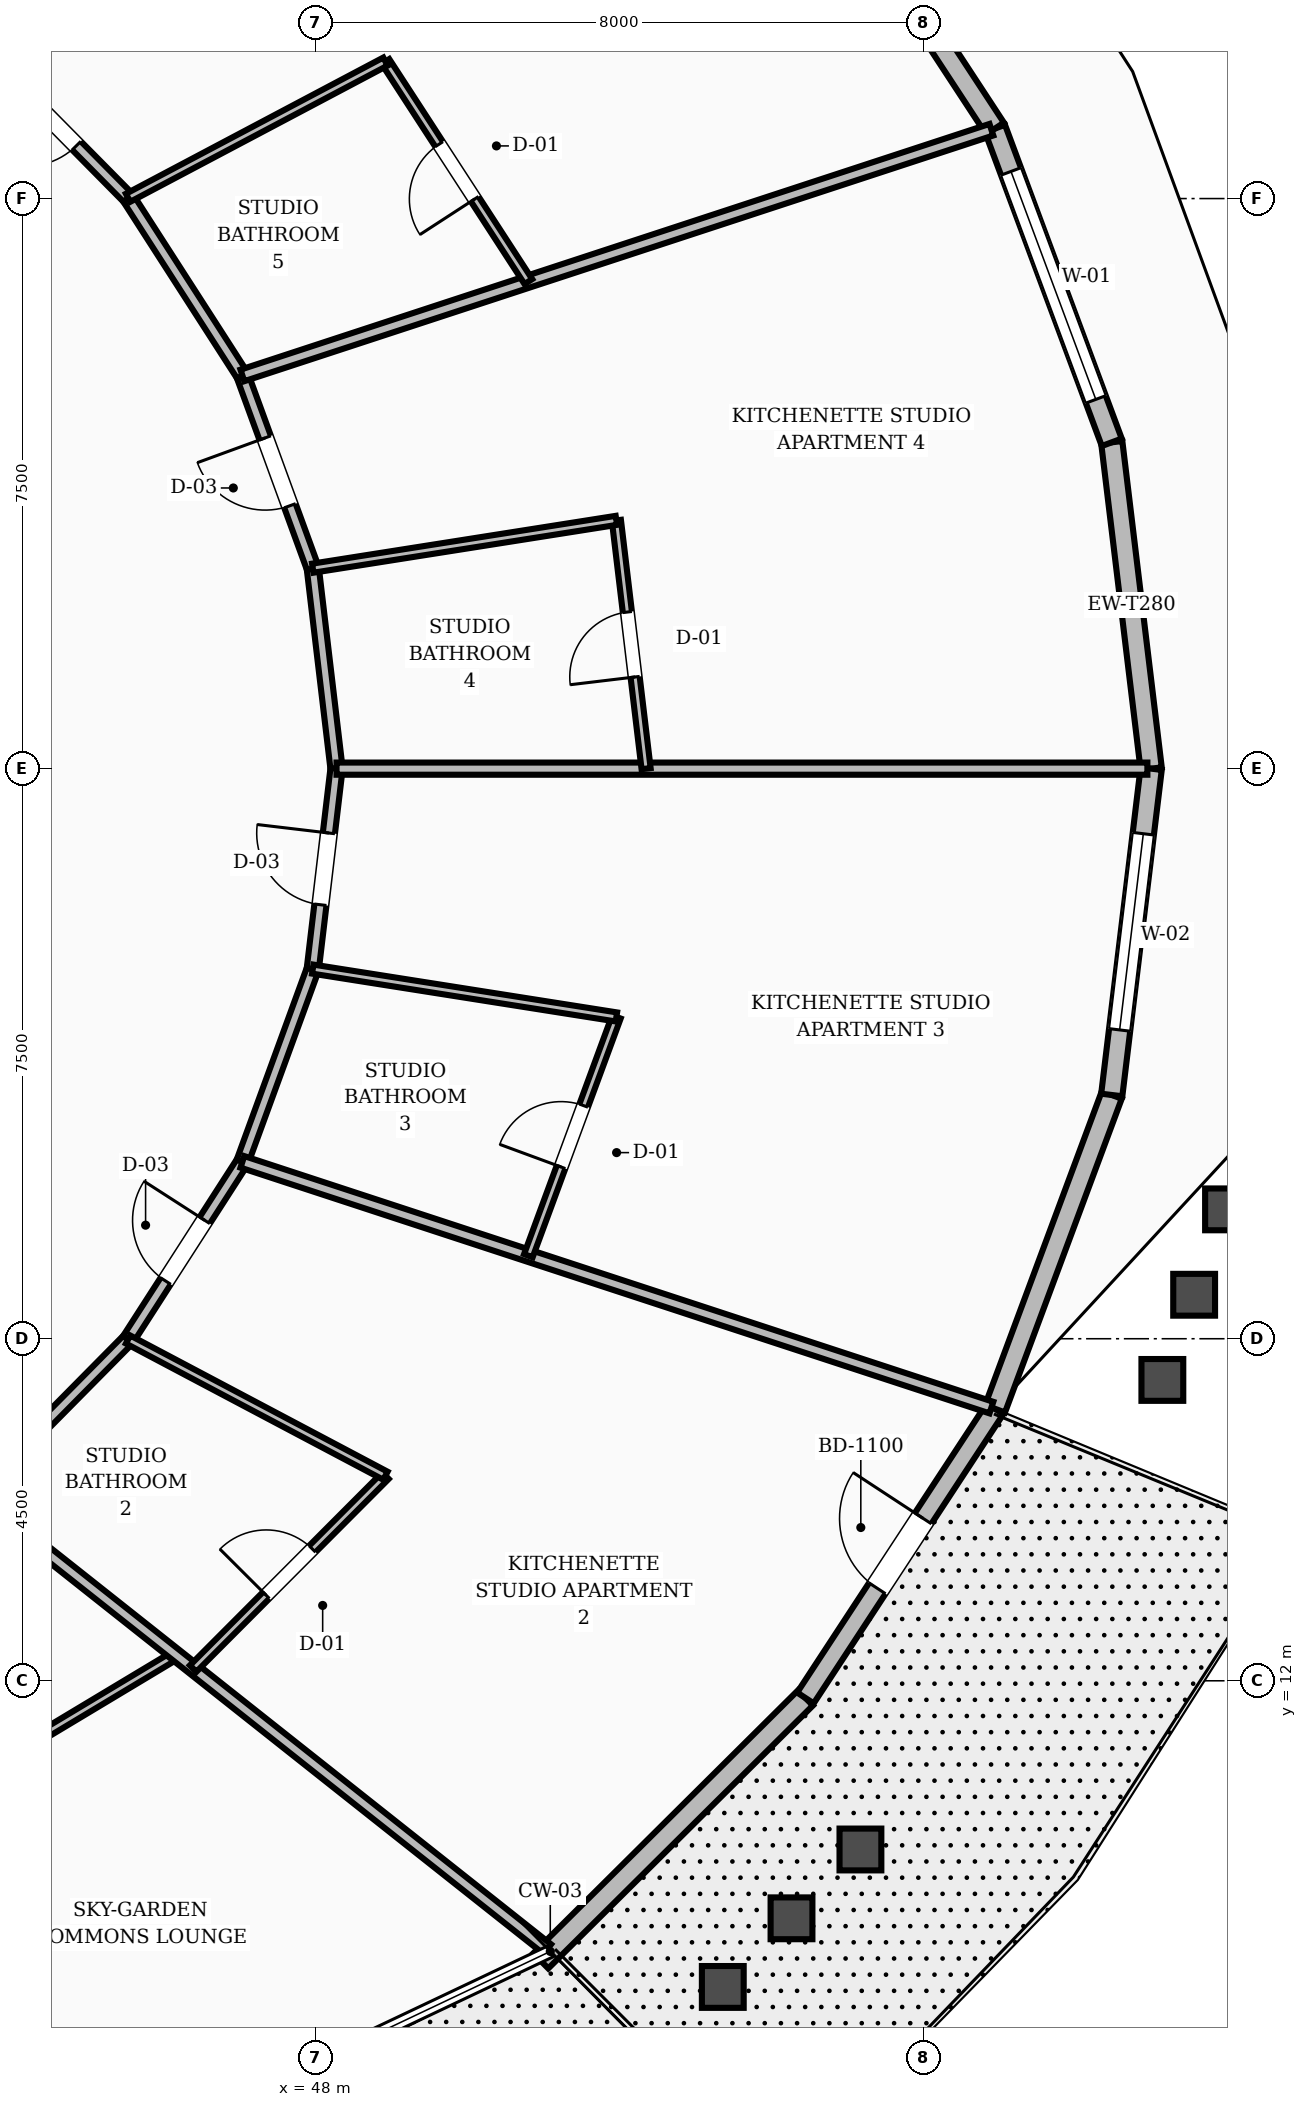
"""IFC4 building model, lengths in metres.
Left out: names, types, materials, properties, quantities, classifications, styles, units other than length and angle.
Written with IfcOpenShell. Run it as: python <this file> out.ifc"""

import sys

from ifc_helpers import new_model, si_unit, direction, frame, frame_2d, origin, place, context, subcontext, project, spatial, rectangle, extrude, element, fill, save


model = new_model("IFC4")
c1 = context("Model", 3, precision=1e-05, world=origin(), true_north=direction((0.0, 1.0)))
c2 = subcontext(c1, "Body", "Model", "MODEL_VIEW")
j1 = project(units=[si_unit("LENGTHUNIT", "METRE"), si_unit("PLANEANGLEUNIT", "RADIAN")], contexts=[c1])
p1 = place(None, origin())
s1 = spatial("IfcSite", under=j1, at=p1, CompositionType="ELEMENT")
p2 = place(p1, origin())
s2 = spatial("IfcBuilding", under=s1, at=p2, CompositionType="ELEMENT")
p3 = place(p2, frame((0.0, 0.0, 88.0)))
s3 = spatial("IfcBuildingStorey", under=s2, at=p3, CompositionType="ELEMENT", Elevation=88.0)
p4 = place(p3, frame((58.992, 24.0, 0.0), z_axis=(0.0, 0.0, 1.0), x_axis=(-0.11991322244, 0.992784376934, 0.0)))
e1 = element("IfcWall", 1, at=p4, inside=s3, PredefinedType="STANDARD", context=c2, shape_type="SweptSolid", body=[
    extrude(rectangle(XDim=4.324, YDim=0.28, at=frame_2d((2.162, 0.0))), origin(), (0.0, 0.0, 1.0), 2.71),
])
p5 = place(p3, frame((58.473, 28.293, 0.0), z_axis=(0.0, 0.0, 1.0), x_axis=(-0.348747298865, 0.937216795376, 0.0)))
e2 = element("IfcWall", 2, at=p5, inside=s3, PredefinedType="STANDARD", context=c2, shape_type="SweptSolid", body=[
    extrude(rectangle(XDim=4.405, YDim=0.28, at=frame_2d((2.202, 0.0))), origin(), (0.0, 0.0, 1.0), 2.71),
])
p6 = place(p5, frame((0.602, 0.0, 0.8)))
e3 = element("IfcOpeningElement", 3, at=p6, cuts=e2, PredefinedType="OPENING", context=c2, shape_type="SweptSolid", body=[
    extrude(rectangle(XDim=3.2, YDim=1.65, at=frame_2d((1.6, 0.825))), frame((0.0, 0.15, 0.0), z_axis=(0.0, -1.0, 0.0), x_axis=(1.0, 0.0, 0.0)), (0.0, 0.0, 1.0), 0.3),
])
p7 = place(p3, frame((56.937, 32.421, 0.0), z_axis=(0.0, 0.0, 1.0), x_axis=(-0.548243756992, 0.836318589366, 0.0)))
e4 = element("IfcWall", 4, at=p7, inside=s3, PredefinedType="STANDARD", context=c2, shape_type="SweptSolid", body=[
    extrude(rectangle(XDim=4.549, YDim=0.28, at=frame_2d((2.275, 0.0))), origin(), (0.0, 0.0, 1.0), 2.71),
])
p8 = place(p3, frame((50.961, 8.315, 0.0), z_axis=(0.0, 0.0, 1.0), x_axis=(0.709441021492, 0.704764809724, 0.0)))
e5 = element("IfcWall", 5, at=p8, inside=s3, PredefinedType="STANDARD", context=c2, shape_type="SweptSolid", body=[
    extrude(rectangle(XDim=4.908, YDim=0.28, at=frame_2d((2.454, 0.0))), origin(), (0.0, 0.0, 1.0), 2.71),
])
p9 = place(p3, frame((54.443, 11.774, 0.0), z_axis=(0.0, 0.0, 1.0), x_axis=(0.548243756992, 0.836318589366, 0.0)))
e6 = element("IfcWall", 6, at=p9, inside=s3, PredefinedType="STANDARD", context=c2, shape_type="SweptSolid", body=[
    extrude(rectangle(XDim=4.549, YDim=0.26, at=frame_2d((2.275, 0.0))), origin(), (0.0, 0.0, 1.0), 2.71),
])
p10 = place(p9, frame((1.725, 0.0, 0.0)))
e7 = element("IfcOpeningElement", 7, at=p10, cuts=e6, PredefinedType="OPENING", context=c2, shape_type="SweptSolid", body=[
    extrude(rectangle(XDim=1.1, YDim=2.15, at=frame_2d((0.55, 1.075))), frame((0.0, 0.14, 0.0), z_axis=(0.0, -1.0, 0.0), x_axis=(1.0, 0.0, 0.0)), (0.0, 0.0, 1.0), 0.28),
])
p11 = place(p3, frame((56.937, 15.579, 0.0), z_axis=(0.0, 0.0, 1.0), x_axis=(0.348747298865, 0.937216795376, 0.0)))
e8 = element("IfcWall", 8, at=p11, inside=s3, PredefinedType="STANDARD", context=c2, shape_type="SweptSolid", body=[
    extrude(rectangle(XDim=4.405, YDim=0.28, at=frame_2d((2.202, 0.0))), origin(), (0.0, 0.0, 1.0), 2.71),
])
p12 = place(p3, frame((58.473, 19.707, 0.0), z_axis=(0.0, 0.0, 1.0), x_axis=(0.11991322244, 0.992784376934, 0.0)))
e9 = element("IfcWall", 9, at=p12, inside=s3, PredefinedType="STANDARD", context=c2, shape_type="SweptSolid", body=[
    extrude(rectangle(XDim=4.324, YDim=0.28, at=frame_2d((2.162, 0.0))), origin(), (0.0, 0.0, 1.0), 2.71),
])
p13 = place(p12, frame((0.862, 0.0, 0.8)))
e10 = element("IfcOpeningElement", 10, at=p13, cuts=e9, PredefinedType="OPENING", context=c2, shape_type="SweptSolid", body=[
    extrude(rectangle(XDim=2.6, YDim=1.65, at=frame_2d((1.3, 0.825))), frame((0.0, 0.15, 0.0), z_axis=(0.0, -1.0, 0.0), x_axis=(1.0, 0.0, 0.0)), (0.0, 0.0, 1.0), 0.3),
])
p14 = place(p3, frame((48.274, 24.0, 0.0), z_axis=(0.0, 0.0, 1.0), x_axis=(-0.117763961213, 0.99304161516, 0.0)))
e11 = element("IfcWall", 11, at=p14, inside=s3, PredefinedType="SOLIDWALL", context=c2, shape_type="SweptSolid", body=[
    extrude(rectangle(XDim=2.656, YDim=0.16, at=frame_2d((1.328, 0.0))), origin(), (0.0, 0.0, 1.0), 2.71),
])
p15 = place(p3, frame((47.961, 26.637, 0.0), z_axis=(0.0, 0.0, 1.0), x_axis=(-0.343013437329, 0.939330496583, 0.0)))
e12 = element("IfcWall", 12, at=p15, inside=s3, PredefinedType="SOLIDWALL", context=c2, shape_type="SweptSolid", body=[
    extrude(rectangle(XDim=2.7, YDim=0.16, at=frame_2d((1.35, 0.0))), origin(), (0.0, 0.0, 1.0), 2.71),
])
p16 = place(p15, frame((0.875, 0.0, 0.0)))
e13 = element("IfcOpeningElement", 13, at=p16, cuts=e12, PredefinedType="OPENING", context=c2, shape_type="SweptSolid", body=[
    extrude(rectangle(XDim=0.95, YDim=2.1, at=frame_2d((0.475, 1.05))), frame((0.0, 0.09, 0.0), z_axis=(0.0, -1.0, 0.0), x_axis=(1.0, 0.0, 0.0)), (0.0, 0.0, 1.0), 0.18),
])
p17 = place(p3, frame((47.035, 29.173, 0.0), z_axis=(0.0, 0.0, 1.0), x_axis=(-0.541126045017, 0.840941498206, 0.0)))
e14 = element("IfcWall", 14, at=p17, inside=s3, PredefinedType="SOLIDWALL", context=c2, shape_type="SweptSolid", body=[
    extrude(rectangle(XDim=2.779, YDim=0.16, at=frame_2d((1.39, 0.0))), origin(), (0.0, 0.0, 1.0), 2.71),
])
p18 = place(p3, frame((45.531, 31.51, 0.0), z_axis=(0.0, 0.0, 1.0), x_axis=(-0.702811997, 0.711375636969, 0.0)))
e15 = element("IfcWall", 15, at=p18, inside=s3, PredefinedType="SOLIDWALL", context=c2, shape_type="SweptSolid", body=[
    extrude(rectangle(XDim=2.879, YDim=0.16, at=frame_2d((1.44, 0.0))), origin(), (0.0, 0.0, 1.0), 2.71),
])
p19 = place(p18, frame((0.965, 0.0, 0.0)))
e16 = element("IfcOpeningElement", 16, at=p19, cuts=e15, PredefinedType="OPENING", context=c2, shape_type="SweptSolid", body=[
    extrude(rectangle(XDim=0.95, YDim=2.1, at=frame_2d((0.475, 1.05))), frame((0.0, 0.09, 0.0), z_axis=(0.0, -1.0, 0.0), x_axis=(1.0, 0.0, 0.0)), (0.0, 0.0, 1.0), 0.18),
])
p20 = place(p3, frame((43.508, 14.441, 0.0), z_axis=(0.0, 0.0, 1.0), x_axis=(0.702811997, 0.711375636969, 0.0)))
e17 = element("IfcWall", 17, at=p20, inside=s3, PredefinedType="SOLIDWALL", context=c2, shape_type="SweptSolid", body=[
    extrude(rectangle(XDim=2.879, YDim=0.16, at=frame_2d((1.44, 0.0))), origin(), (0.0, 0.0, 1.0), 2.71),
])
p21 = place(p3, frame((45.531, 16.49, 0.0), z_axis=(0.0, 0.0, 1.0), x_axis=(0.541126045017, 0.840941498206, 0.0)))
e18 = element("IfcWall", 18, at=p21, inside=s3, PredefinedType="SOLIDWALL", context=c2, shape_type="SweptSolid", body=[
    extrude(rectangle(XDim=2.779, YDim=0.16, at=frame_2d((1.39, 0.0))), origin(), (0.0, 0.0, 1.0), 2.71),
])
p22 = place(p21, frame((0.915, 0.0, 0.0)))
e19 = element("IfcOpeningElement", 19, at=p22, cuts=e18, PredefinedType="OPENING", context=c2, shape_type="SweptSolid", body=[
    extrude(rectangle(XDim=0.95, YDim=2.1, at=frame_2d((0.475, 1.05))), frame((0.0, 0.09, 0.0), z_axis=(0.0, -1.0, 0.0), x_axis=(1.0, 0.0, 0.0)), (0.0, 0.0, 1.0), 0.18),
])
p23 = place(p3, frame((47.035, 18.827, 0.0), z_axis=(0.0, 0.0, 1.0), x_axis=(0.343013437329, 0.939330496583, 0.0)))
e20 = element("IfcWall", 20, at=p23, inside=s3, PredefinedType="SOLIDWALL", context=c2, shape_type="SweptSolid", body=[
    extrude(rectangle(XDim=2.7, YDim=0.16, at=frame_2d((1.35, 0.0))), origin(), (0.0, 0.0, 1.0), 2.71),
])
p24 = place(p3, frame((47.961, 21.363, 0.0), z_axis=(0.0, 0.0, 1.0), x_axis=(0.117763961213, 0.99304161516, 0.0)))
e21 = element("IfcWall", 21, at=p24, inside=s3, PredefinedType="SOLIDWALL", context=c2, shape_type="SweptSolid", body=[
    extrude(rectangle(XDim=2.656, YDim=0.16, at=frame_2d((1.328, 0.0))), origin(), (0.0, 0.0, 1.0), 2.71),
])
p25 = place(p24, frame((0.853, 0.0, 0.0)))
e22 = element("IfcOpeningElement", 22, at=p25, cuts=e21, PredefinedType="OPENING", context=c2, shape_type="SweptSolid", body=[
    extrude(rectangle(XDim=0.95, YDim=2.1, at=frame_2d((0.475, 1.05))), frame((0.0, 0.09, 0.0), z_axis=(0.0, -1.0, 0.0), x_axis=(1.0, 0.0, 0.0)), (0.0, 0.0, 1.0), 0.18),
])
p26 = place(p3, frame((43.017, 10.453, 0.0), z_axis=(0.0, 0.0, 1.0), x_axis=(0.857287225794, 0.514838433385, 0.0)))
e23 = element("IfcWall", 23, at=p26, inside=s3, PredefinedType="PARTITIONING", context=c2, shape_type="SweptSolid", body=[
    extrude(rectangle(XDim=3.667, YDim=0.12, at=frame_2d((1.833, 0.0))), origin(), (0.0, 0.0, 1.0), 2.71),
])
p27 = place(p3, frame((43.508, 14.441, 0.0), z_axis=(0.0, 0.0, 1.0), x_axis=(0.783915576776, -0.620867432298, 0.0)))
e24 = element("IfcWall", 24, at=p27, inside=s3, PredefinedType="SOLIDWALL", context=c2, shape_type="SweptSolid", body=[
    extrude(rectangle(XDim=9.617, YDim=0.16, at=frame_2d((4.809, 0.0))), origin(), (0.0, 0.0, 1.0), 2.71),
])
p28 = place(p3, frame((46.387, 12.16, 0.0), z_axis=(0.0, 0.0, 1.0), x_axis=(0.706152338319, 0.708059937496, 0.0)))
e25 = element("IfcWall", 25, at=p28, inside=s3, PredefinedType="PARTITIONING", context=c2, shape_type="SweptSolid", body=[
    extrude(rectangle(XDim=3.583, YDim=0.12, at=frame_2d((1.792, 0.0))), origin(), (0.0, 0.0, 1.0), 2.71),
])
p29 = place(p28, frame((1.362, 0.0, 0.0)))
e26 = element("IfcOpeningElement", 26, at=p29, cuts=e25, PredefinedType="OPENING", context=c2, shape_type="SweptSolid", body=[
    extrude(rectangle(XDim=0.86, YDim=2.1, at=frame_2d((0.43, 1.05))), frame((0.0, 0.07, 0.0), z_axis=(0.0, -1.0, 0.0), x_axis=(1.0, 0.0, 0.0)), (0.0, 0.0, 1.0), 0.14),
])
p30 = place(p3, frame((45.531, 16.49, 0.0), z_axis=(0.0, 0.0, 1.0), x_axis=(0.883879348267, -0.46771497486, 0.0)))
e27 = element("IfcWall", 27, at=p30, inside=s3, PredefinedType="PARTITIONING", context=c2, shape_type="SweptSolid", body=[
    extrude(rectangle(XDim=3.831, YDim=0.12, at=frame_2d((1.916, 0.0))), origin(), (0.0, 0.0, 1.0), 2.71),
])
p31 = place(p3, frame((47.035, 18.827, 0.0), z_axis=(0.0, 0.0, 1.0), x_axis=(0.950181432226, -0.311697362603, 0.0)))
e28 = element("IfcWall", 28, at=p31, inside=s3, PredefinedType="SOLIDWALL", context=c2, shape_type="SweptSolid", body=[
    extrude(rectangle(XDim=10.371, YDim=0.16, at=frame_2d((5.186, 0.0))), origin(), (0.0, 0.0, 1.0), 2.71),
])
p32 = place(p3, frame((50.798, 17.593, 0.0), z_axis=(0.0, 0.0, 1.0), x_axis=(0.345914895338, 0.938265892582, 0.0)))
e29 = element("IfcWall", 29, at=p32, inside=s3, PredefinedType="PARTITIONING", context=c2, shape_type="SweptSolid", body=[
    extrude(rectangle(XDim=3.347, YDim=0.12, at=frame_2d((1.674, 0.0))), origin(), (0.0, 0.0, 1.0), 2.71),
])
p33 = place(p32, frame((1.244, 0.0, 0.0)))
e30 = element("IfcOpeningElement", 30, at=p33, cuts=e29, PredefinedType="OPENING", context=c2, shape_type="SweptSolid", body=[
    extrude(rectangle(XDim=0.86, YDim=2.1, at=frame_2d((0.43, 1.05))), frame((0.0, 0.07, 0.0), z_axis=(0.0, -1.0, 0.0), x_axis=(1.0, 0.0, 0.0)), (0.0, 0.0, 1.0), 0.14),
])
p34 = place(p3, frame((47.961, 21.363, 0.0), z_axis=(0.0, 0.0, 1.0), x_axis=(0.987813821357, -0.155640143715, 0.0)))
e31 = element("IfcWall", 31, at=p34, inside=s3, PredefinedType="PARTITIONING", context=c2, shape_type="SweptSolid", body=[
    extrude(rectangle(XDim=4.044, YDim=0.12, at=frame_2d((2.022, 0.0))), origin(), (0.0, 0.0, 1.0), 2.71),
])
p35 = place(p3, frame((48.274, 24.0, 0.0), z_axis=(0.0, 0.0, 1.0), x_axis=(1.0, 0.0, 0.0)))
e32 = element("IfcWall", 32, at=p35, inside=s3, PredefinedType="SOLIDWALL", context=c2, shape_type="SweptSolid", body=[
    extrude(rectangle(XDim=10.668, YDim=0.16, at=frame_2d((5.334, 0.0))), origin(), (0.0, 0.0, 1.0), 2.71),
])
p36 = place(p3, frame((52.347, 24.0, 0.0), z_axis=(0.0, 0.0, 1.0), x_axis=(-0.118808697947, 0.992917163359, 0.0)))
e33 = element("IfcWall", 33, at=p36, inside=s3, PredefinedType="PARTITIONING", context=c2, shape_type="SweptSolid", body=[
    extrude(rectangle(XDim=3.29, YDim=0.12, at=frame_2d((1.645, 0.0))), origin(), (0.0, 0.0, 1.0), 2.71),
])
p37 = place(p36, frame((1.215, 0.0, 0.0)))
e34 = element("IfcOpeningElement", 34, at=p37, cuts=e33, PredefinedType="OPENING", context=c2, shape_type="SweptSolid", body=[
    extrude(rectangle(XDim=0.86, YDim=2.1, at=frame_2d((0.43, 1.05))), frame((0.0, 0.07, 0.0), z_axis=(0.0, -1.0, 0.0), x_axis=(1.0, 0.0, 0.0)), (0.0, 0.0, 1.0), 0.14),
])
p38 = place(p3, frame((47.961, 26.637, 0.0), z_axis=(0.0, 0.0, 1.0), x_axis=(0.987813821357, 0.155640143715, 0.0)))
e35 = element("IfcWall", 35, at=p38, inside=s3, PredefinedType="PARTITIONING", context=c2, shape_type="SweptSolid", body=[
    extrude(rectangle(XDim=4.044, YDim=0.12, at=frame_2d((2.022, 0.0))), origin(), (0.0, 0.0, 1.0), 2.71),
])
p39 = place(p3, frame((47.035, 29.173, 0.0), z_axis=(0.0, 0.0, 1.0), x_axis=(0.950181432226, 0.311697362603, 0.0)))
e36 = element("IfcWall", 36, at=p39, inside=s3, PredefinedType="SOLIDWALL", context=c2, shape_type="SweptSolid", body=[
    extrude(rectangle(XDim=10.371, YDim=0.16, at=frame_2d((5.186, 0.0))), origin(), (0.0, 0.0, 1.0), 2.71),
])
p40 = place(p3, frame((50.798, 30.407, 0.0), z_axis=(0.0, 0.0, 1.0), x_axis=(-0.544687497821, 0.83863909384, 0.0)))
e37 = element("IfcWall", 37, at=p40, inside=s3, PredefinedType="PARTITIONING", context=c2, shape_type="SweptSolid", body=[
    extrude(rectangle(XDim=3.452, YDim=0.12, at=frame_2d((1.726, 0.0))), origin(), (0.0, 0.0, 1.0), 2.71),
])
p41 = place(p40, frame((1.296, 0.0, 0.0)))
e38 = element("IfcOpeningElement", 38, at=p41, cuts=e37, PredefinedType="OPENING", context=c2, shape_type="SweptSolid", body=[
    extrude(rectangle(XDim=0.86, YDim=2.1, at=frame_2d((0.43, 1.05))), frame((0.0, 0.07, 0.0), z_axis=(0.0, -1.0, 0.0), x_axis=(1.0, 0.0, 0.0)), (0.0, 0.0, 1.0), 0.14),
])
p42 = place(p3, frame((45.531, 31.51, 0.0), z_axis=(0.0, 0.0, 1.0), x_axis=(0.883879348267, 0.46771497486, 0.0)))
e39 = element("IfcWall", 39, at=p42, inside=s3, PredefinedType="PARTITIONING", context=c2, shape_type="SweptSolid", body=[
    extrude(rectangle(XDim=3.831, YDim=0.12, at=frame_2d((1.916, 0.0))), origin(), (0.0, 0.0, 1.0), 2.71),
])
p43 = place(p6, origin())
e40 = element("IfcWindow", 40, at=p43, inside=s3, PartitioningType="SINGLE_PANEL", PredefinedType="WINDOW", context=c2, shape_type="SweptSolid", body=[
    extrude(rectangle(XDim=3.2, YDim=1.65, at=frame_2d((1.6, 0.825))), frame((0.0, 0.03, 0.0), z_axis=(0.0, -1.0, 0.0), x_axis=(1.0, 0.0, 0.0)), (0.0, 0.0, 1.0), 0.06),
])
fill(e3, e40)
p44 = place(p10, origin())
e41 = element("IfcDoor", 41, at=p44, inside=s3, OperationType="SINGLE_SWING_RIGHT", PredefinedType="DOOR", context=c2, shape_type="SweptSolid", body=[
    extrude(rectangle(XDim=1.1, YDim=2.15, at=frame_2d((0.55, 1.075))), frame((0.0, 0.025, 0.0), z_axis=(0.0, -1.0, 0.0), x_axis=(1.0, 0.0, 0.0)), (0.0, 0.0, 1.0), 0.05),
])
fill(e7, e41)
p45 = place(p13, origin())
e42 = element("IfcWindow", 42, at=p45, inside=s3, PartitioningType="SINGLE_PANEL", PredefinedType="WINDOW", context=c2, shape_type="SweptSolid", body=[
    extrude(rectangle(XDim=2.6, YDim=1.65, at=frame_2d((1.3, 0.825))), frame((0.0, 0.03, 0.0), z_axis=(0.0, -1.0, 0.0), x_axis=(1.0, 0.0, 0.0)), (0.0, 0.0, 1.0), 0.06),
])
fill(e10, e42)
p46 = place(p29, origin())
e43 = element("IfcDoor", 43, at=p46, inside=s3, OperationType="SINGLE_SWING_LEFT", PredefinedType="DOOR", context=c2, shape_type="SweptSolid", body=[
    extrude(rectangle(XDim=0.86, YDim=2.1, at=frame_2d((0.43, 1.05))), frame((0.0, 0.025, 0.0), z_axis=(0.0, -1.0, 0.0), x_axis=(1.0, 0.0, 0.0)), (0.0, 0.0, 1.0), 0.05),
])
fill(e26, e43)
p47 = place(p22, origin())
e44 = element("IfcDoor", 44, at=p47, inside=s3, OperationType="SINGLE_SWING_RIGHT", PredefinedType="DOOR", context=c2, shape_type="SweptSolid", body=[
    extrude(rectangle(XDim=0.95, YDim=2.1, at=frame_2d((0.475, 1.05))), frame((0.0, 0.025, 0.0), z_axis=(0.0, -1.0, 0.0), x_axis=(1.0, 0.0, 0.0)), (0.0, 0.0, 1.0), 0.05),
])
fill(e19, e44)
p48 = place(p33, origin())
e45 = element("IfcDoor", 45, at=p48, inside=s3, OperationType="SINGLE_SWING_LEFT", PredefinedType="DOOR", context=c2, shape_type="SweptSolid", body=[
    extrude(rectangle(XDim=0.86, YDim=2.1, at=frame_2d((0.43, 1.05))), frame((0.0, 0.025, 0.0), z_axis=(0.0, -1.0, 0.0), x_axis=(1.0, 0.0, 0.0)), (0.0, 0.0, 1.0), 0.05),
])
fill(e30, e45)
p49 = place(p25, origin())
e46 = element("IfcDoor", 46, at=p49, inside=s3, OperationType="SINGLE_SWING_RIGHT", PredefinedType="DOOR", context=c2, shape_type="SweptSolid", body=[
    extrude(rectangle(XDim=0.95, YDim=2.1, at=frame_2d((0.475, 1.05))), frame((0.0, 0.025, 0.0), z_axis=(0.0, -1.0, 0.0), x_axis=(1.0, 0.0, 0.0)), (0.0, 0.0, 1.0), 0.05),
])
fill(e22, e46)
p50 = place(p37, origin())
e47 = element("IfcDoor", 47, at=p50, inside=s3, OperationType="SINGLE_SWING_LEFT", PredefinedType="DOOR", context=c2, shape_type="SweptSolid", body=[
    extrude(rectangle(XDim=0.86, YDim=2.1, at=frame_2d((0.43, 1.05))), frame((0.0, 0.025, 0.0), z_axis=(0.0, -1.0, 0.0), x_axis=(1.0, 0.0, 0.0)), (0.0, 0.0, 1.0), 0.05),
])
fill(e34, e47)
p51 = place(p16, origin())
e48 = element("IfcDoor", 48, at=p51, inside=s3, OperationType="SINGLE_SWING_RIGHT", PredefinedType="DOOR", context=c2, shape_type="SweptSolid", body=[
    extrude(rectangle(XDim=0.95, YDim=2.1, at=frame_2d((0.475, 1.05))), frame((0.0, 0.025, 0.0), z_axis=(0.0, -1.0, 0.0), x_axis=(1.0, 0.0, 0.0)), (0.0, 0.0, 1.0), 0.05),
])
fill(e13, e48)
p52 = place(p41, origin())
e49 = element("IfcDoor", 49, at=p52, inside=s3, OperationType="SINGLE_SWING_LEFT", PredefinedType="DOOR", context=c2, shape_type="SweptSolid", body=[
    extrude(rectangle(XDim=0.86, YDim=2.1, at=frame_2d((0.43, 1.05))), frame((0.0, 0.025, 0.0), z_axis=(0.0, -1.0, 0.0), x_axis=(1.0, 0.0, 0.0)), (0.0, 0.0, 1.0), 0.05),
])
fill(e38, e49)
p53 = place(p19, origin())
e50 = element("IfcDoor", 50, at=p53, inside=s3, OperationType="SINGLE_SWING_RIGHT", PredefinedType="DOOR", context=c2, shape_type="SweptSolid", body=[
    extrude(rectangle(XDim=0.95, YDim=2.1, at=frame_2d((0.475, 1.05))), frame((0.0, 0.025, 0.0), z_axis=(0.0, -1.0, 0.0), x_axis=(1.0, 0.0, 0.0)), (0.0, 0.0, 1.0), 0.05),
])
fill(e16, e50)
save(model, sys.argv[1])
